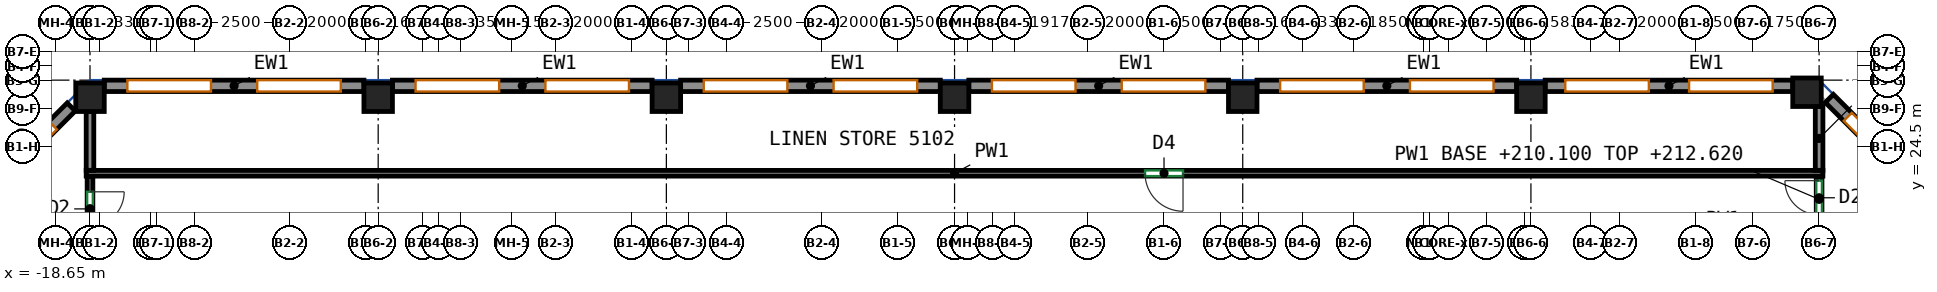
"""IFC4 building model, lengths in metres.
Left out: names, types, materials, properties, quantities, classifications, styles, units other than length and angle.
Written with IfcOpenShell. Run it as: python <this file> out.ifc"""

import sys

from ifc_helpers import new_model, si_unit, direction, frame, frame_2d, origin, origin_2d, place, context, subcontext, project, spatial, rectangle, extrude, source, transform, mapped, element, fill, save


model = new_model("IFC4")
c1 = context("Model", 3, precision=1e-05, world=origin(), true_north=direction((0.0, 1.0)))
c2 = subcontext(c1, "Body", "Model", "MODEL_VIEW")
j1 = project(units=[si_unit("LENGTHUNIT", "METRE"), si_unit("PLANEANGLEUNIT", "RADIAN")], contexts=[c1])
p1 = place(None, origin())
s1 = spatial("IfcSite", under=j1, at=p1, CompositionType="ELEMENT")
p2 = place(p1, origin())
s2 = spatial("IfcBuilding", under=s1, at=p2, CompositionType="ELEMENT")
p3 = place(p2, frame((0.0, 0.0, 210.1)))
s3 = spatial("IfcBuildingStorey", under=s2, at=p3, CompositionType="ELEMENT", Elevation=210.1)
m1 = source(origin(), c2, "Body", "SweptSolid", [
    extrude(rectangle(XDim=0.75, YDim=0.75, at=origin_2d()), origin(), (0.0, 0.0, 1.0), 3.12),
])
for number, where, z_axis, x_axis in (
    (1, (-17.75, 25.8, 0.0), (0.0, 0.0, 1.0), (1.0, 0.0, 0.0)),
    (2, (-10.167, 25.8, 0.0), (0.0, 0.0, 1.0), (1.0, 0.0, 0.0)),
    (3, (-2.583, 25.8, 0.0), (0.0, 0.0, 1.0), (1.0, 0.0, 0.0)),
    (4, (5.0, 25.8, 0.0), (0.0, 0.0, 1.0), (1.0, 0.0, 0.0)),
    (5, (12.583, 25.8, 0.0), (0.0, 0.0, 1.0), (1.0, 0.0, 0.0)),
    (6, (20.167, 25.8, 0.0), (0.0, 0.0, 1.0), (1.0, 0.0, 0.0)),
    (7, (27.432, 25.932, 0.0), (0.0, 0.0, 1.0), (1.0, 0.0, 0.0)),
):
    element("IfcColumn", number, at=place(p3, frame(where, z_axis=z_axis, x_axis=x_axis)), inside=s3, PredefinedType="COLUMN", context=c2, shape_type="MappedRepresentation", body=[
        mapped(m1, transform((0.0, 0.0, 0.0))),
    ])
m2 = source(origin(), c2, "Body", "SweptSolid", [
    extrude(rectangle(XDim=3.571, YDim=0.3, at=frame_2d((1.786, 0.0))), origin(), (0.0, 0.0, 1.0), 3.12),
])
p4 = place(p3, frame((30.544, 23.244, 0.0), z_axis=(0.0, 0.0, 1.0), x_axis=(-0.707140964879, 0.707072595841, 0.0)))
e8 = element("IfcWall", 8, at=p4, inside=s3, PredefinedType="SOLIDWALL", context=c2, shape_type="MappedRepresentation", body=[
    mapped(m2, transform((0.0, 0.0, 0.0))),
])
p5 = place(p4, frame((0.686, 0.0, 0.85)))
e9 = element("IfcOpeningElement", 9, at=p5, cuts=e8, PredefinedType="OPENING", context=c2, shape_type="SweptSolid", body=[
    extrude(rectangle(XDim=2.2, YDim=1.95, at=frame_2d((1.1, 0.975))), frame((0.0, 0.16, 0.0), z_axis=(0.0, -1.0, 0.0), x_axis=(1.0, 0.0, 0.0)), (0.0, 0.0, 1.0), 0.32),
])
m3 = source(origin(), c2, "Body", "SweptSolid", [
    extrude(rectangle(XDim=6.515, YDim=0.3, at=frame_2d((3.258, 0.0))), origin(), (0.0, 0.0, 1.0), 3.12),
])
p6 = place(p3, frame((27.057, 26.1, 0.0), z_axis=(0.0, 0.0, 1.0), x_axis=(-1.0, 0.0, 0.0)))
e10 = element("IfcWall", 10, at=p6, inside=s3, PredefinedType="SOLIDWALL", context=c2, shape_type="MappedRepresentation", body=[
    mapped(m3, transform((0.0, 0.0, 0.0))),
])
p7 = place(p6, frame((0.529, 0.0, 0.85)))
e11 = element("IfcOpeningElement", 11, at=p7, cuts=e10, PredefinedType="OPENING", context=c2, shape_type="SweptSolid", body=[
    extrude(rectangle(XDim=2.2, YDim=1.95, at=frame_2d((1.1, 0.975))), frame((0.0, 0.16, 0.0), z_axis=(0.0, -1.0, 0.0), x_axis=(1.0, 0.0, 0.0)), (0.0, 0.0, 1.0), 0.32),
])
p8 = place(p6, frame((3.786, 0.0, 0.85)))
e12 = element("IfcOpeningElement", 12, at=p8, cuts=e10, PredefinedType="OPENING", context=c2, shape_type="SweptSolid", body=[
    extrude(rectangle(XDim=2.2, YDim=1.95, at=frame_2d((1.1, 0.975))), frame((0.0, 0.16, 0.0), z_axis=(0.0, -1.0, 0.0), x_axis=(1.0, 0.0, 0.0)), (0.0, 0.0, 1.0), 0.32),
])
m4 = source(origin(), c2, "Body", "SweptSolid", [
    extrude(rectangle(XDim=6.833, YDim=0.3, at=frame_2d((3.417, 0.0))), origin(), (0.0, 0.0, 1.0), 3.12),
])
p9 = place(p3, frame((19.792, 26.1, 0.0), z_axis=(0.0, 0.0, 1.0), x_axis=(-1.0, 0.0, 0.0)))
e13 = element("IfcWall", 13, at=p9, inside=s3, PredefinedType="SOLIDWALL", context=c2, shape_type="MappedRepresentation", body=[
    mapped(m4, transform((0.0, 0.0, 0.0))),
])
p10 = place(p9, frame((0.608, 0.0, 0.85)))
e14 = element("IfcOpeningElement", 14, at=p10, cuts=e13, PredefinedType="OPENING", context=c2, shape_type="SweptSolid", body=[
    extrude(rectangle(XDim=2.2, YDim=1.95, at=frame_2d((1.1, 0.975))), frame((0.0, 0.16, 0.0), z_axis=(0.0, -1.0, 0.0), x_axis=(1.0, 0.0, 0.0)), (0.0, 0.0, 1.0), 0.32),
])
p11 = place(p9, frame((4.025, 0.0, 0.85)))
e15 = element("IfcOpeningElement", 15, at=p11, cuts=e13, PredefinedType="OPENING", context=c2, shape_type="SweptSolid", body=[
    extrude(rectangle(XDim=2.2, YDim=1.95, at=frame_2d((1.1, 0.975))), frame((0.0, 0.16, 0.0), z_axis=(0.0, -1.0, 0.0), x_axis=(1.0, 0.0, 0.0)), (0.0, 0.0, 1.0), 0.32),
])
m5 = source(origin(), c2, "Body", "SweptSolid", [
    extrude(rectangle(XDim=6.833, YDim=0.3, at=frame_2d((3.417, 0.0))), origin(), (0.0, 0.0, 1.0), 3.12),
])
p12 = place(p3, frame((12.208, 26.1, 0.0), z_axis=(0.0, 0.0, 1.0), x_axis=(-1.0, 0.0, 0.0)))
e16 = element("IfcWall", 16, at=p12, inside=s3, PredefinedType="SOLIDWALL", context=c2, shape_type="MappedRepresentation", body=[
    mapped(m5, transform((0.0, 0.0, 0.0))),
])
p13 = place(p12, frame((0.608, 0.0, 0.85)))
e17 = element("IfcOpeningElement", 17, at=p13, cuts=e16, PredefinedType="OPENING", context=c2, shape_type="SweptSolid", body=[
    extrude(rectangle(XDim=2.2, YDim=1.95, at=frame_2d((1.1, 0.975))), frame((0.0, 0.16, 0.0), z_axis=(0.0, -1.0, 0.0), x_axis=(1.0, 0.0, 0.0)), (0.0, 0.0, 1.0), 0.32),
])
p14 = place(p12, frame((4.025, 0.0, 0.85)))
e18 = element("IfcOpeningElement", 18, at=p14, cuts=e16, PredefinedType="OPENING", context=c2, shape_type="SweptSolid", body=[
    extrude(rectangle(XDim=2.2, YDim=1.95, at=frame_2d((1.1, 0.975))), frame((0.0, 0.16, 0.0), z_axis=(0.0, -1.0, 0.0), x_axis=(1.0, 0.0, 0.0)), (0.0, 0.0, 1.0), 0.32),
])
p15 = place(p3, frame((4.625, 26.1, 0.0), z_axis=(0.0, 0.0, 1.0), x_axis=(-1.0, 0.0, 0.0)))
e19 = element("IfcWall", 19, at=p15, inside=s3, PredefinedType="SOLIDWALL", context=c2, shape_type="MappedRepresentation", body=[
    mapped(m5, transform((0.0, 0.0, 0.0))),
])
p16 = place(p15, frame((0.608, 0.0, 0.85)))
e20 = element("IfcOpeningElement", 20, at=p16, cuts=e19, PredefinedType="OPENING", context=c2, shape_type="SweptSolid", body=[
    extrude(rectangle(XDim=2.2, YDim=1.95, at=frame_2d((1.1, 0.975))), frame((0.0, 0.16, 0.0), z_axis=(0.0, -1.0, 0.0), x_axis=(1.0, 0.0, 0.0)), (0.0, 0.0, 1.0), 0.32),
])
p17 = place(p15, frame((4.025, 0.0, 0.85)))
e21 = element("IfcOpeningElement", 21, at=p17, cuts=e19, PredefinedType="OPENING", context=c2, shape_type="SweptSolid", body=[
    extrude(rectangle(XDim=2.2, YDim=1.95, at=frame_2d((1.1, 0.975))), frame((0.0, 0.16, 0.0), z_axis=(0.0, -1.0, 0.0), x_axis=(1.0, 0.0, 0.0)), (0.0, 0.0, 1.0), 0.32),
])
p18 = place(p3, frame((-2.958, 26.1, 0.0), z_axis=(0.0, 0.0, 1.0), x_axis=(-1.0, 0.0, 0.0)))
e22 = element("IfcWall", 22, at=p18, inside=s3, PredefinedType="SOLIDWALL", context=c2, shape_type="MappedRepresentation", body=[
    mapped(m4, transform((0.0, 0.0, 0.0))),
])
p19 = place(p18, frame((0.608, 0.0, 0.85)))
e23 = element("IfcOpeningElement", 23, at=p19, cuts=e22, PredefinedType="OPENING", context=c2, shape_type="SweptSolid", body=[
    extrude(rectangle(XDim=2.2, YDim=1.95, at=frame_2d((1.1, 0.975))), frame((0.0, 0.16, 0.0), z_axis=(0.0, -1.0, 0.0), x_axis=(1.0, 0.0, 0.0)), (0.0, 0.0, 1.0), 0.32),
])
p20 = place(p18, frame((4.025, 0.0, 0.85)))
e24 = element("IfcOpeningElement", 24, at=p20, cuts=e22, PredefinedType="OPENING", context=c2, shape_type="SweptSolid", body=[
    extrude(rectangle(XDim=2.2, YDim=1.95, at=frame_2d((1.1, 0.975))), frame((0.0, 0.16, 0.0), z_axis=(0.0, -1.0, 0.0), x_axis=(1.0, 0.0, 0.0)), (0.0, 0.0, 1.0), 0.32),
])
p21 = place(p3, frame((-10.542, 26.1, 0.0), z_axis=(0.0, 0.0, 1.0), x_axis=(-1.0, 0.0, 0.0)))
e25 = element("IfcWall", 25, at=p21, inside=s3, PredefinedType="SOLIDWALL", context=c2, shape_type="MappedRepresentation", body=[
    mapped(m5, transform((0.0, 0.0, 0.0))),
])
p22 = place(p21, frame((0.608, 0.0, 0.85)))
e26 = element("IfcOpeningElement", 26, at=p22, cuts=e25, PredefinedType="OPENING", context=c2, shape_type="SweptSolid", body=[
    extrude(rectangle(XDim=2.2, YDim=1.95, at=frame_2d((1.1, 0.975))), frame((0.0, 0.16, 0.0), z_axis=(0.0, -1.0, 0.0), x_axis=(1.0, 0.0, 0.0)), (0.0, 0.0, 1.0), 0.32),
])
p23 = place(p21, frame((4.025, 0.0, 0.85)))
e27 = element("IfcOpeningElement", 27, at=p23, cuts=e25, PredefinedType="OPENING", context=c2, shape_type="SweptSolid", body=[
    extrude(rectangle(XDim=2.2, YDim=1.95, at=frame_2d((1.1, 0.975))), frame((0.0, 0.16, 0.0), z_axis=(0.0, -1.0, 0.0), x_axis=(1.0, 0.0, 0.0)), (0.0, 0.0, 1.0), 0.32),
])
p24 = place(p3, frame((-18.244, 25.544, 0.0), z_axis=(0.0, 0.0, 1.0), x_axis=(-0.707072595841, -0.707140964879, 0.0)))
e28 = element("IfcWall", 28, at=p24, inside=s3, PredefinedType="SOLIDWALL", context=c2, shape_type="MappedRepresentation", body=[
    mapped(m2, transform((0.0, 0.0, 0.0))),
])
p25 = place(p24, frame((0.686, 0.0, 0.85)))
e29 = element("IfcOpeningElement", 29, at=p25, cuts=e28, PredefinedType="OPENING", context=c2, shape_type="SweptSolid", body=[
    extrude(rectangle(XDim=2.2, YDim=1.95, at=frame_2d((1.1, 0.975))), frame((0.0, 0.16, 0.0), z_axis=(0.0, -1.0, 0.0), x_axis=(1.0, 0.0, 0.0)), (0.0, 0.0, 1.0), 0.32),
])
p26 = place(p3, frame((-17.75, 23.725, 0.0), z_axis=(0.0, 0.0, 1.0), x_axis=(0.0, -1.0, 0.0)))
e30 = element("IfcWall", 30, at=p26, inside=s3, PredefinedType="PARTITIONING", context=c2, shape_type="SweptSolid", body=[
    extrude(rectangle(XDim=1.725, YDim=0.15, at=frame_2d((0.863, 0.0))), origin(), (0.0, 0.0, 1.0), 3.12),
])
p27 = place(p26, frame((0.413, 0.0, 0.0)))
e31 = element("IfcOpeningElement", 31, at=p27, cuts=e30, PredefinedType="OPENING", context=c2, shape_type="SweptSolid", body=[
    extrude(rectangle(XDim=0.9, YDim=2.1, at=frame_2d((0.45, 1.05))), frame((0.0, 0.085, 0.0), z_axis=(0.0, -1.0, 0.0), x_axis=(1.0, 0.0, 0.0)), (0.0, 0.0, 1.0), 0.17),
])
p28 = place(p3, frame((27.75, 22.503, 0.0), z_axis=(0.0, 0.0, 1.0), x_axis=(0.0, 1.0, 0.0)))
e32 = element("IfcWall", 32, at=p28, inside=s3, PredefinedType="PARTITIONING", context=c2, shape_type="SweptSolid", body=[
    extrude(rectangle(XDim=1.222, YDim=0.15, at=frame_2d((0.611, 0.0))), origin(), (0.0, 0.0, 1.0), 2.52),
])
p29 = place(p28, frame((0.202, 0.0, 0.0)))
e33 = element("IfcOpeningElement", 33, at=p29, cuts=e32, PredefinedType="OPENING", context=c2, shape_type="SweptSolid", body=[
    extrude(rectangle(XDim=0.9, YDim=2.1, at=frame_2d((0.45, 1.05))), frame((0.0, 0.085, 0.0), z_axis=(0.0, -1.0, 0.0), x_axis=(1.0, 0.0, 0.0)), (0.0, 0.0, 1.0), 0.17),
])
p30 = place(p3, frame((27.85, 23.8, 0.0), z_axis=(0.0, 0.0, 1.0), x_axis=(-1.0, 0.0, 0.0)))
e34 = element("IfcWall", 34, at=p30, inside=s3, PredefinedType="PARTITIONING", context=c2, shape_type="SweptSolid", body=[
    extrude(rectangle(XDim=45.7, YDim=0.15, at=frame_2d((22.85, 0.0))), origin(), (0.0, 0.0, 1.0), 3.12),
])
p31 = place(p30, frame((16.838, 0.0, 0.0)))
e35 = element("IfcOpeningElement", 35, at=p31, cuts=e34, PredefinedType="OPENING", context=c2, shape_type="SweptSolid", body=[
    extrude(rectangle(XDim=1.0, YDim=2.1, at=frame_2d((0.5, 1.05))), frame((0.0, 0.085, 0.0), z_axis=(0.0, -1.0, 0.0), x_axis=(1.0, 0.0, 0.0)), (0.0, 0.0, 1.0), 0.17),
])
p32 = place(p3, frame((-17.75, 23.877, 0.0), z_axis=(0.0, 0.0, 1.0), x_axis=(0.0, 1.0, 0.0)))
e36 = element("IfcWall", 36, at=p32, inside=s3, PredefinedType="PARTITIONING", context=c2, shape_type="SweptSolid", body=[
    extrude(rectangle(XDim=1.548, YDim=0.2, at=frame_2d((0.774, 0.0))), origin(), (0.0, 0.0, 1.0), 3.12),
])
p33 = place(p3, frame((27.75, 25.557, 0.0), z_axis=(0.0, 0.0, 1.0), x_axis=(0.0, -1.0, 0.0)))
e37 = element("IfcWall", 37, at=p33, inside=s3, PredefinedType="PARTITIONING", context=c2, shape_type="SweptSolid", body=[
    extrude(rectangle(XDim=1.68, YDim=0.2, at=frame_2d((0.84, 0.0))), origin(), (0.0, 0.0, 1.0), 2.52),
])
p34 = place(p5, origin())
e38 = element("IfcWindow", 38, at=p34, inside=s3, PartitioningType="SINGLE_PANEL", PredefinedType="WINDOW", context=c2, shape_type="SweptSolid", body=[
    extrude(rectangle(XDim=2.2, YDim=1.95, at=frame_2d((1.1, 0.975))), frame((0.0, 0.03, 0.0), z_axis=(0.0, -1.0, 0.0), x_axis=(1.0, 0.0, 0.0)), (0.0, 0.0, 1.0), 0.06),
])
fill(e9, e38)
p35 = place(p7, origin())
e39 = element("IfcWindow", 39, at=p35, inside=s3, PartitioningType="SINGLE_PANEL", PredefinedType="WINDOW", context=c2, shape_type="SweptSolid", body=[
    extrude(rectangle(XDim=2.2, YDim=1.95, at=frame_2d((1.1, 0.975))), frame((0.0, 0.03, 0.0), z_axis=(0.0, -1.0, 0.0), x_axis=(1.0, 0.0, 0.0)), (0.0, 0.0, 1.0), 0.06),
])
fill(e11, e39)
p36 = place(p8, origin())
e40 = element("IfcWindow", 40, at=p36, inside=s3, PartitioningType="SINGLE_PANEL", PredefinedType="WINDOW", context=c2, shape_type="SweptSolid", body=[
    extrude(rectangle(XDim=2.2, YDim=1.95, at=frame_2d((1.1, 0.975))), frame((0.0, 0.03, 0.0), z_axis=(0.0, -1.0, 0.0), x_axis=(1.0, 0.0, 0.0)), (0.0, 0.0, 1.0), 0.06),
])
fill(e12, e40)
p37 = place(p10, origin())
e41 = element("IfcWindow", 41, at=p37, inside=s3, PartitioningType="SINGLE_PANEL", PredefinedType="WINDOW", context=c2, shape_type="SweptSolid", body=[
    extrude(rectangle(XDim=2.2, YDim=1.95, at=frame_2d((1.1, 0.975))), frame((0.0, 0.03, 0.0), z_axis=(0.0, -1.0, 0.0), x_axis=(1.0, 0.0, 0.0)), (0.0, 0.0, 1.0), 0.06),
])
fill(e14, e41)
p38 = place(p11, origin())
e42 = element("IfcWindow", 42, at=p38, inside=s3, PartitioningType="SINGLE_PANEL", PredefinedType="WINDOW", context=c2, shape_type="SweptSolid", body=[
    extrude(rectangle(XDim=2.2, YDim=1.95, at=frame_2d((1.1, 0.975))), frame((0.0, 0.03, 0.0), z_axis=(0.0, -1.0, 0.0), x_axis=(1.0, 0.0, 0.0)), (0.0, 0.0, 1.0), 0.06),
])
fill(e15, e42)
p39 = place(p13, origin())
e43 = element("IfcWindow", 43, at=p39, inside=s3, PartitioningType="SINGLE_PANEL", PredefinedType="WINDOW", context=c2, shape_type="SweptSolid", body=[
    extrude(rectangle(XDim=2.2, YDim=1.95, at=frame_2d((1.1, 0.975))), frame((0.0, 0.03, 0.0), z_axis=(0.0, -1.0, 0.0), x_axis=(1.0, 0.0, 0.0)), (0.0, 0.0, 1.0), 0.06),
])
fill(e17, e43)
p40 = place(p14, origin())
e44 = element("IfcWindow", 44, at=p40, inside=s3, PartitioningType="SINGLE_PANEL", PredefinedType="WINDOW", context=c2, shape_type="SweptSolid", body=[
    extrude(rectangle(XDim=2.2, YDim=1.95, at=frame_2d((1.1, 0.975))), frame((0.0, 0.03, 0.0), z_axis=(0.0, -1.0, 0.0), x_axis=(1.0, 0.0, 0.0)), (0.0, 0.0, 1.0), 0.06),
])
fill(e18, e44)
p41 = place(p16, origin())
e45 = element("IfcWindow", 45, at=p41, inside=s3, PartitioningType="SINGLE_PANEL", PredefinedType="WINDOW", context=c2, shape_type="SweptSolid", body=[
    extrude(rectangle(XDim=2.2, YDim=1.95, at=frame_2d((1.1, 0.975))), frame((0.0, 0.03, 0.0), z_axis=(0.0, -1.0, 0.0), x_axis=(1.0, 0.0, 0.0)), (0.0, 0.0, 1.0), 0.06),
])
fill(e20, e45)
p42 = place(p17, origin())
e46 = element("IfcWindow", 46, at=p42, inside=s3, PartitioningType="SINGLE_PANEL", PredefinedType="WINDOW", context=c2, shape_type="SweptSolid", body=[
    extrude(rectangle(XDim=2.2, YDim=1.95, at=frame_2d((1.1, 0.975))), frame((0.0, 0.03, 0.0), z_axis=(0.0, -1.0, 0.0), x_axis=(1.0, 0.0, 0.0)), (0.0, 0.0, 1.0), 0.06),
])
fill(e21, e46)
p43 = place(p19, origin())
e47 = element("IfcWindow", 47, at=p43, inside=s3, PartitioningType="SINGLE_PANEL", PredefinedType="WINDOW", context=c2, shape_type="SweptSolid", body=[
    extrude(rectangle(XDim=2.2, YDim=1.95, at=frame_2d((1.1, 0.975))), frame((0.0, 0.03, 0.0), z_axis=(0.0, -1.0, 0.0), x_axis=(1.0, 0.0, 0.0)), (0.0, 0.0, 1.0), 0.06),
])
fill(e23, e47)
p44 = place(p20, origin())
e48 = element("IfcWindow", 48, at=p44, inside=s3, PartitioningType="SINGLE_PANEL", PredefinedType="WINDOW", context=c2, shape_type="SweptSolid", body=[
    extrude(rectangle(XDim=2.2, YDim=1.95, at=frame_2d((1.1, 0.975))), frame((0.0, 0.03, 0.0), z_axis=(0.0, -1.0, 0.0), x_axis=(1.0, 0.0, 0.0)), (0.0, 0.0, 1.0), 0.06),
])
fill(e24, e48)
p45 = place(p22, origin())
e49 = element("IfcWindow", 49, at=p45, inside=s3, PartitioningType="SINGLE_PANEL", PredefinedType="WINDOW", context=c2, shape_type="SweptSolid", body=[
    extrude(rectangle(XDim=2.2, YDim=1.95, at=frame_2d((1.1, 0.975))), frame((0.0, 0.03, 0.0), z_axis=(0.0, -1.0, 0.0), x_axis=(1.0, 0.0, 0.0)), (0.0, 0.0, 1.0), 0.06),
])
fill(e26, e49)
p46 = place(p23, origin())
e50 = element("IfcWindow", 50, at=p46, inside=s3, PartitioningType="SINGLE_PANEL", PredefinedType="WINDOW", context=c2, shape_type="SweptSolid", body=[
    extrude(rectangle(XDim=2.2, YDim=1.95, at=frame_2d((1.1, 0.975))), frame((0.0, 0.03, 0.0), z_axis=(0.0, -1.0, 0.0), x_axis=(1.0, 0.0, 0.0)), (0.0, 0.0, 1.0), 0.06),
])
fill(e27, e50)
p47 = place(p25, origin())
e51 = element("IfcWindow", 51, at=p47, inside=s3, PartitioningType="SINGLE_PANEL", PredefinedType="WINDOW", context=c2, shape_type="SweptSolid", body=[
    extrude(rectangle(XDim=2.2, YDim=1.95, at=frame_2d((1.1, 0.975))), frame((0.0, 0.03, 0.0), z_axis=(0.0, -1.0, 0.0), x_axis=(1.0, 0.0, 0.0)), (0.0, 0.0, 1.0), 0.06),
])
fill(e29, e51)
p48 = place(p27, origin())
e52 = element("IfcDoor", 52, at=p48, inside=s3, OperationType="SINGLE_SWING_LEFT", PredefinedType="DOOR", context=c2, shape_type="SweptSolid", body=[
    extrude(rectangle(XDim=0.9, YDim=2.1, at=frame_2d((0.45, 1.05))), frame((0.0, 0.025, 0.0), z_axis=(0.0, -1.0, 0.0), x_axis=(1.0, 0.0, 0.0)), (0.0, 0.0, 1.0), 0.05),
])
fill(e31, e52)
p49 = place(p29, origin())
e53 = element("IfcDoor", 53, at=p49, inside=s3, OperationType="SINGLE_SWING_RIGHT", PredefinedType="DOOR", context=c2, shape_type="SweptSolid", body=[
    extrude(rectangle(XDim=0.9, YDim=2.1, at=frame_2d((0.45, 1.05))), frame((0.0, 0.025, 0.0), z_axis=(0.0, -1.0, 0.0), x_axis=(1.0, 0.0, 0.0)), (0.0, 0.0, 1.0), 0.05),
])
fill(e33, e53)
p50 = place(p31, origin())
e54 = element("IfcDoor", 54, at=p50, inside=s3, OperationType="SINGLE_SWING_LEFT", PredefinedType="DOOR", context=c2, shape_type="SweptSolid", body=[
    extrude(rectangle(XDim=1.0, YDim=2.1, at=frame_2d((0.5, 1.05))), frame((0.0, 0.025, 0.0), z_axis=(0.0, -1.0, 0.0), x_axis=(1.0, 0.0, 0.0)), (0.0, 0.0, 1.0), 0.05),
])
fill(e35, e54)
save(model, sys.argv[1])
